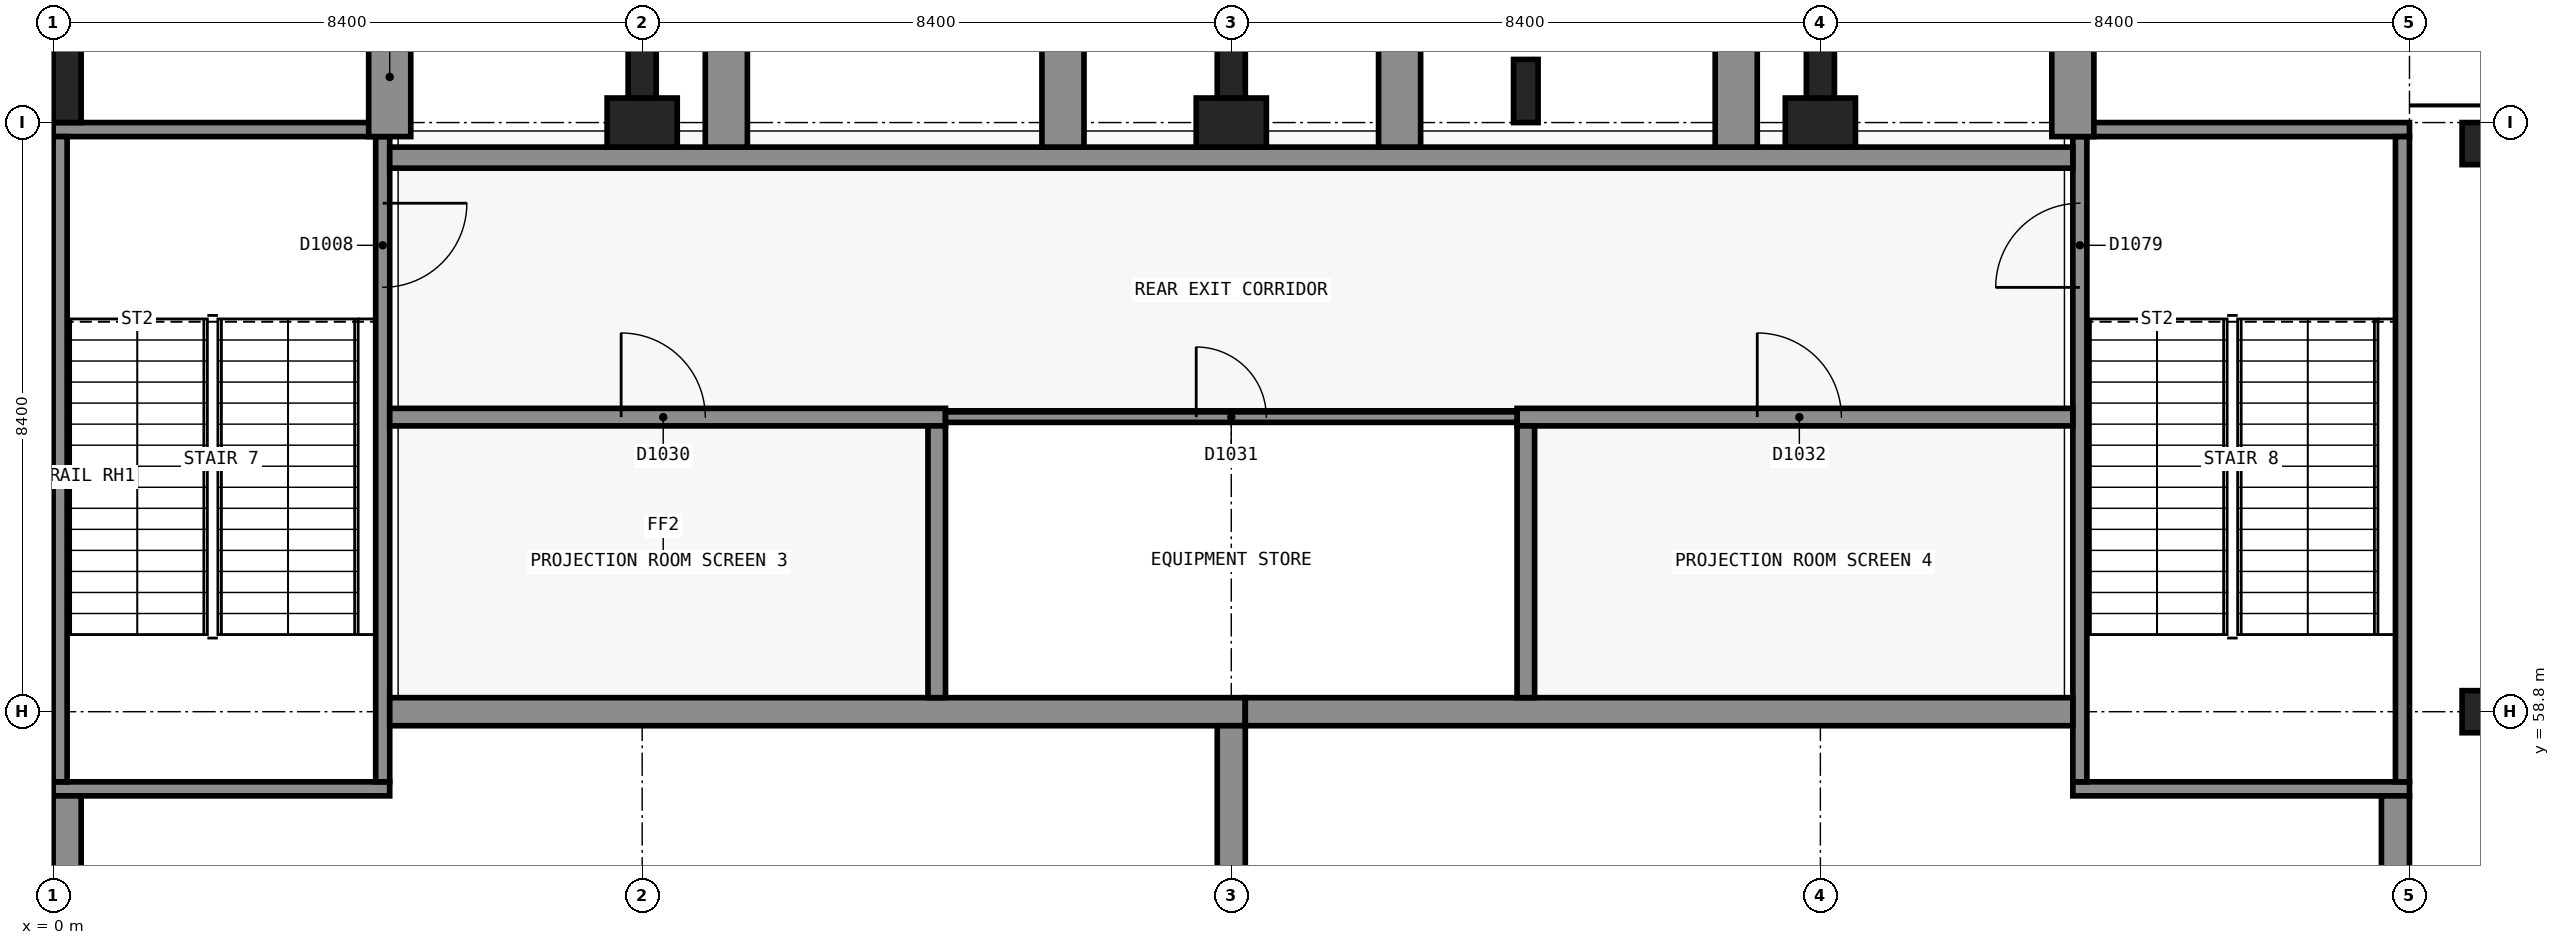
"""IFC4 building model, lengths in metres.
Left out: names, types, materials, properties, quantities, classifications, styles, units other than length and angle.
Written with IfcOpenShell. Run it as: python <this file> out.ifc"""

import sys

from ifc_helpers import new_model, si_unit, direction, frame, frame_2d, origin, origin_2d, place, context, subcontext, project, spatial, rectangle, extrude, element, fill, save


model = new_model("IFC4")
c1 = context("Model", 3, precision=1e-05, world=origin(), true_north=direction((0.0, 1.0)))
c2 = subcontext(c1, "Body", "Model", "MODEL_VIEW")
j1 = project(units=[si_unit("LENGTHUNIT", "METRE"), si_unit("PLANEANGLEUNIT", "RADIAN")], contexts=[c1])
p1 = place(None, origin())
s1 = spatial("IfcSite", under=j1, at=p1, CompositionType="ELEMENT")
p2 = place(p1, origin())
s2 = spatial("IfcBuilding", under=s1, at=p2, CompositionType="ELEMENT")
p3 = place(p2, frame((0.0, 0.0, 5.4)))
s3 = spatial("IfcBuildingStorey", under=s2, at=p3, CompositionType="ELEMENT", Elevation=5.4)
for number, where, z_axis, x_axis in (
    (1, (4.8, 57.7, 0.0), (0.0, 0.0, 1.0), (-1.0, 0.0, 0.0)),
    (2, (0.0, 67.1, 0.0), (0.0, 0.0, 1.0), (1.0, 0.0, 0.0)),
):
    element("IfcWall", number, at=place(p3, frame(where, z_axis=z_axis, x_axis=x_axis)), inside=s3, PredefinedType="SHEAR", context=c2, shape_type="SweptSolid", body=[
        extrude(rectangle(XDim=4.8, YDim=0.2, at=frame_2d((2.4, 0.0))), origin(), (0.0, 0.0, 1.0), 4.8),
    ])
p4 = place(p3, frame((0.1, 57.8, 0.0), z_axis=(0.0, 0.0, 1.0), x_axis=(0.0, 1.0, 0.0)))
e3 = element("IfcWall", 3, at=p4, inside=s3, PredefinedType="SHEAR", context=c2, shape_type="SweptSolid", body=[
    extrude(rectangle(XDim=9.2, YDim=0.2, at=frame_2d((4.6, 0.0))), origin(), (0.0, 0.0, 1.0), 4.8),
])
p5 = place(p3, frame((4.7, 67.0, 0.0), z_axis=(0.0, 0.0, 1.0), x_axis=(0.0, -1.0, 0.0)))
e4 = element("IfcWall", 4, at=p5, inside=s3, PredefinedType="SHEAR", context=c2, shape_type="SweptSolid", body=[
    extrude(rectangle(XDim=9.2, YDim=0.2, at=frame_2d((4.6, 0.0))), origin(), (0.0, 0.0, 1.0), 4.8),
])
p6 = place(p5, frame((0.95, 0.0, 0.0)))
e5 = element("IfcOpeningElement", 5, at=p6, cuts=e4, PredefinedType="OPENING", context=c2, shape_type="SweptSolid", body=[
    extrude(rectangle(XDim=1.2, YDim=2.1, at=frame_2d((0.6, 1.05))), frame((0.0, 0.11, 0.0), z_axis=(0.0, -1.0, 0.0), x_axis=(1.0, 0.0, 0.0)), (0.0, 0.0, 1.0), 0.22),
])
for number, where, z_axis, x_axis in (
    (6, (33.6, 57.7, 0.0), (0.0, 0.0, 1.0), (-1.0, 0.0, 0.0)),
    (7, (28.8, 67.1, 0.0), (0.0, 0.0, 1.0), (1.0, 0.0, 0.0)),
):
    element("IfcWall", number, at=place(p3, frame(where, z_axis=z_axis, x_axis=x_axis)), inside=s3, PredefinedType="SHEAR", context=c2, shape_type="SweptSolid", body=[
        extrude(rectangle(XDim=4.8, YDim=0.2, at=frame_2d((2.4, 0.0))), origin(), (0.0, 0.0, 1.0), 4.8),
    ])
p7 = place(p3, frame((28.9, 57.8, 0.0), z_axis=(0.0, 0.0, 1.0), x_axis=(0.0, 1.0, 0.0)))
e8 = element("IfcWall", 8, at=p7, inside=s3, PredefinedType="SHEAR", context=c2, shape_type="SweptSolid", body=[
    extrude(rectangle(XDim=9.2, YDim=0.2, at=frame_2d((4.6, 0.0))), origin(), (0.0, 0.0, 1.0), 4.8),
])
p8 = place(p7, frame((7.05, 0.0, 0.0)))
e9 = element("IfcOpeningElement", 9, at=p8, cuts=e8, PredefinedType="OPENING", context=c2, shape_type="SweptSolid", body=[
    extrude(rectangle(XDim=1.2, YDim=2.1, at=frame_2d((0.6, 1.05))), frame((0.0, 0.11, 0.0), z_axis=(0.0, -1.0, 0.0), x_axis=(1.0, 0.0, 0.0)), (0.0, 0.0, 1.0), 0.22),
])
p9 = place(p3, frame((33.5, 67.0, 0.0), z_axis=(0.0, 0.0, 1.0), x_axis=(0.0, -1.0, 0.0)))
e10 = element("IfcWall", 10, at=p9, inside=s3, PredefinedType="SHEAR", context=c2, shape_type="SweptSolid", body=[
    extrude(rectangle(XDim=9.2, YDim=0.2, at=frame_2d((4.6, 0.0))), origin(), (0.0, 0.0, 1.0), 4.8),
])
p10 = place(p3, frame((4.8, 58.8, 0.0), z_axis=(0.0, 0.0, 1.0), x_axis=(1.0, 0.0, 0.0)))
e11 = element("IfcWall", 11, at=p10, inside=s3, PredefinedType="SHEAR", context=c2, shape_type="SweptSolid", body=[
    extrude(rectangle(XDim=12.2, YDim=0.4, at=frame_2d((6.1, 0.0))), origin(), (0.0, 0.0, 1.0), 4.8),
])
p11 = place(p3, frame((0.2, 43.2, 0.0), z_axis=(0.0, 0.0, 1.0), x_axis=(0.0, 1.0, 0.0)))
e12 = element("IfcWall", 12, at=p11, inside=s3, PredefinedType="SHEAR", context=c2, shape_type="SweptSolid", body=[
    extrude(rectangle(XDim=14.4, YDim=0.4, at=frame_2d((7.2, 0.0))), origin(), (0.0, 0.0, 1.0), 4.8),
])
p12 = place(p3, frame((16.8, 58.6, 0.0), z_axis=(0.0, 0.0, 1.0), x_axis=(0.0, -1.0, 0.0)))
e13 = element("IfcWall", 13, at=p12, inside=s3, PredefinedType="SHEAR", context=c2, shape_type="SweptSolid", body=[
    extrude(rectangle(XDim=16.4, YDim=0.4, at=frame_2d((8.2, 0.0))), origin(), (0.0, 0.0, 1.0), 4.8),
])
p13 = place(p3, frame((17.0, 58.8, 0.0), z_axis=(0.0, 0.0, 1.0), x_axis=(1.0, 0.0, 0.0)))
e14 = element("IfcWall", 14, at=p13, inside=s3, PredefinedType="SHEAR", context=c2, shape_type="SweptSolid", body=[
    extrude(rectangle(XDim=11.8, YDim=0.4, at=frame_2d((5.9, 0.0))), origin(), (0.0, 0.0, 1.0), 4.8),
])
p14 = place(p3, frame((33.4, 57.6, 0.0), z_axis=(0.0, 0.0, 1.0), x_axis=(0.0, -1.0, 0.0)))
e15 = element("IfcWall", 15, at=p14, inside=s3, PredefinedType="SHEAR", context=c2, shape_type="SweptSolid", body=[
    extrude(rectangle(XDim=15.4, YDim=0.4, at=frame_2d((7.7, 0.0))), origin(), (0.0, 0.0, 1.0), 4.8),
])
for number, where, z_axis, x_axis in (
    (16, (8.4, 67.2, 0.0), (0.0, 0.0, 1.0), (1.0, 0.0, 0.0)),
    (17, (16.8, 67.2, 0.0), (0.0, 0.0, 1.0), (1.0, 0.0, 0.0)),
    (18, (25.2, 67.2, 0.0), (0.0, 0.0, 1.0), (1.0, 0.0, 0.0)),
):
    element("IfcColumn", number, at=place(p3, frame(where, z_axis=z_axis, x_axis=x_axis)), inside=s3, PredefinedType="COLUMN", context=c2, shape_type="SweptSolid", body=[
        extrude(rectangle(XDim=1.0, YDim=0.7, at=origin_2d()), origin(), (0.0, 0.0, 1.0), 4.8),
    ])
for number, where, z_axis, x_axis in (
    (19, (34.65, 58.8, 0.0), (0.0, 0.0, 1.0), (1.0, 0.0, 0.0)),
    (20, (34.65, 66.9, 0.0), (0.0, 0.0, 1.0), (1.0, 0.0, 0.0)),
):
    element("IfcColumn", number, at=place(p3, frame(where, z_axis=z_axis, x_axis=x_axis)), inside=s3, PredefinedType="COLUMN", context=c2, shape_type="SweptSolid", body=[
        extrude(rectangle(XDim=0.6, YDim=0.6, at=origin_2d()), origin(), (0.0, 0.0, 1.0), 4.8),
    ])
p15 = place(p3, frame((4.8, 66.7, 0.0), z_axis=(0.0, 0.0, 1.0), x_axis=(1.0, 0.0, 0.0)))
e21 = element("IfcWall", 21, at=p15, inside=s3, PredefinedType="SOLIDWALL", context=c2, shape_type="SweptSolid", body=[
    extrude(rectangle(XDim=24.0, YDim=0.3, at=frame_2d((12.0, 0.0))), origin(), (0.0, 0.0, 1.0), 4.5),
])
for number, where, z_axis, x_axis in (
    (22, (0.2, 67.8, 0.0), (0.0, 0.0, 1.0), (1.0, 0.0, 0.0)),
    (23, (8.4, 68.15, 0.0), (0.0, 0.0, 1.0), (1.0, 0.0, 0.0)),
    (24, (16.8, 68.15, 0.0), (0.0, 0.0, 1.0), (1.0, 0.0, 0.0)),
):
    element("IfcColumn", number, at=place(p3, frame(where, z_axis=z_axis, x_axis=x_axis)), inside=s3, PredefinedType="PILASTER", context=c2, shape_type="SweptSolid", body=[
        extrude(rectangle(XDim=0.4, YDim=1.2, at=origin_2d()), origin(), (0.0, 0.0, 1.0), 4.8),
    ])
p16 = place(p3, frame((21.0, 67.65, 0.0), z_axis=(0.0, 0.0, 1.0), x_axis=(1.0, 0.0, 0.0)))
e25 = element("IfcColumn", 25, at=p16, inside=s3, PredefinedType="PILASTER", context=c2, shape_type="SweptSolid", body=[
    extrude(rectangle(XDim=0.35, YDim=0.9, at=origin_2d()), origin(), (0.0, 0.0, 1.0), 4.8),
])
p17 = place(p3, frame((25.2, 68.15, 0.0), z_axis=(0.0, 0.0, 1.0), x_axis=(1.0, 0.0, 0.0)))
e26 = element("IfcColumn", 26, at=p17, inside=s3, PredefinedType="PILASTER", context=c2, shape_type="SweptSolid", body=[
    extrude(rectangle(XDim=0.4, YDim=1.2, at=origin_2d()), origin(), (0.0, 0.0, 1.0), 4.8),
])
p18 = place(p3, frame((4.8, 67.0, 0.0), z_axis=(0.0, 0.0, 1.0), x_axis=(0.0, 1.0, 0.0)))
e27 = element("IfcWall", 27, at=p18, inside=s3, PredefinedType="SOLIDWALL", context=c2, shape_type="SweptSolid", body=[
    extrude(rectangle(XDim=1.7, YDim=0.6, at=frame_2d((0.85, 0.0))), origin(), (0.0, 0.0, 1.0), 4.8),
])
for number, where, z_axis, x_axis in (
    (28, (9.6, 66.85, 0.0), (0.0, 0.0, 1.0), (0.0, 1.0, 0.0)),
    (29, (14.4, 66.85, 0.0), (0.0, 0.0, 1.0), (0.0, 1.0, 0.0)),
    (30, (19.2, 66.85, 0.0), (0.0, 0.0, 1.0), (0.0, 1.0, 0.0)),
    (31, (24.0, 66.85, 0.0), (0.0, 0.0, 1.0), (0.0, 1.0, 0.0)),
):
    element("IfcWall", number, at=place(p3, frame(where, z_axis=z_axis, x_axis=x_axis)), inside=s3, PredefinedType="SOLIDWALL", context=c2, shape_type="SweptSolid", body=[
        extrude(rectangle(XDim=1.85, YDim=0.6, at=frame_2d((0.925, 0.0))), origin(), (0.0, 0.0, 1.0), 4.8),
    ])
p19 = place(p3, frame((28.8, 67.0, 0.0), z_axis=(0.0, 0.0, 1.0), x_axis=(0.0, 1.0, 0.0)))
e32 = element("IfcWall", 32, at=p19, inside=s3, PredefinedType="SOLIDWALL", context=c2, shape_type="SweptSolid", body=[
    extrude(rectangle(XDim=1.7, YDim=0.6, at=frame_2d((0.85, 0.0))), origin(), (0.0, 0.0, 1.0), 4.8),
])
p20 = place(p3, frame((4.8, 63.0, 0.0), z_axis=(0.0, 0.0, 1.0), x_axis=(1.0, 0.0, 0.0)))
e33 = element("IfcWall", 33, at=p20, inside=s3, PredefinedType="PARTITIONING", context=c2, shape_type="SweptSolid", body=[
    extrude(rectangle(XDim=7.925, YDim=0.25, at=frame_2d((3.962, 0.0))), origin(), (0.0, 0.0, 1.0), 3.8),
])
p21 = place(p20, frame((3.3, 0.0, 0.0)))
e34 = element("IfcOpeningElement", 34, at=p21, cuts=e33, PredefinedType="OPENING", context=c2, shape_type="SweptSolid", body=[
    extrude(rectangle(XDim=1.2, YDim=2.1, at=frame_2d((0.6, 1.05))), frame((0.0, 0.135, 0.0), z_axis=(0.0, -1.0, 0.0), x_axis=(1.0, 0.0, 0.0)), (0.0, 0.0, 1.0), 0.27),
])
p22 = place(p3, frame((20.875, 63.0, 0.0), z_axis=(0.0, 0.0, 1.0), x_axis=(1.0, 0.0, 0.0)))
e35 = element("IfcWall", 35, at=p22, inside=s3, PredefinedType="PARTITIONING", context=c2, shape_type="SweptSolid", body=[
    extrude(rectangle(XDim=7.925, YDim=0.25, at=frame_2d((3.962, 0.0))), origin(), (0.0, 0.0, 1.0), 3.8),
])
p23 = place(p22, frame((3.425, 0.0, 0.0)))
e36 = element("IfcOpeningElement", 36, at=p23, cuts=e35, PredefinedType="OPENING", context=c2, shape_type="SweptSolid", body=[
    extrude(rectangle(XDim=1.2, YDim=2.1, at=frame_2d((0.6, 1.05))), frame((0.0, 0.135, 0.0), z_axis=(0.0, -1.0, 0.0), x_axis=(1.0, 0.0, 0.0)), (0.0, 0.0, 1.0), 0.27),
])
for number, where, z_axis, x_axis in (
    (37, (12.6, 59.0, 0.0), (0.0, 0.0, 1.0), (0.0, 1.0, 0.0)),
    (38, (21.0, 59.0, 0.0), (0.0, 0.0, 1.0), (0.0, 1.0, 0.0)),
):
    element("IfcWall", number, at=place(p3, frame(where, z_axis=z_axis, x_axis=x_axis)), inside=s3, PredefinedType="PARTITIONING", context=c2, shape_type="SweptSolid", body=[
        extrude(rectangle(XDim=3.875, YDim=0.25, at=frame_2d((1.938, 0.0))), origin(), (0.0, 0.0, 1.0), 4.5),
    ])
p24 = place(p3, frame((12.725, 63.0, 0.0), z_axis=(0.0, 0.0, 1.0), x_axis=(1.0, 0.0, 0.0)))
e39 = element("IfcWall", 39, at=p24, inside=s3, PredefinedType="PARTITIONING", context=c2, shape_type="SweptSolid", body=[
    extrude(rectangle(XDim=8.15, YDim=0.15, at=frame_2d((4.075, 0.0))), origin(), (0.0, 0.0, 1.0), 3.8),
])
p25 = place(p24, frame((3.575, 0.0, 0.0)))
e40 = element("IfcOpeningElement", 40, at=p25, cuts=e39, PredefinedType="OPENING", context=c2, shape_type="SweptSolid", body=[
    extrude(rectangle(XDim=1.0, YDim=2.1, at=frame_2d((0.5, 1.05))), frame((0.0, 0.085, 0.0), z_axis=(0.0, -1.0, 0.0), x_axis=(1.0, 0.0, 0.0)), (0.0, 0.0, 1.0), 0.17),
])
p26 = place(p6, origin())
e41 = element("IfcDoor", 41, at=p26, inside=s3, OperationType="SINGLE_SWING_RIGHT", PredefinedType="DOOR", context=c2, shape_type="SweptSolid", body=[
    extrude(rectangle(XDim=1.2, YDim=2.1, at=frame_2d((0.6, 1.05))), frame((0.0, 0.025, 0.0), z_axis=(0.0, -1.0, 0.0), x_axis=(1.0, 0.0, 0.0)), (0.0, 0.0, 1.0), 0.05),
])
fill(e5, e41)
p27 = place(p21, origin())
e42 = element("IfcDoor", 42, at=p27, inside=s3, OperationType="SINGLE_SWING_LEFT", PredefinedType="DOOR", context=c2, shape_type="SweptSolid", body=[
    extrude(rectangle(XDim=1.2, YDim=2.1, at=frame_2d((0.6, 1.05))), frame((0.0, 0.025, 0.0), z_axis=(0.0, -1.0, 0.0), x_axis=(1.0, 0.0, 0.0)), (0.0, 0.0, 1.0), 0.05),
])
fill(e34, e42)
p28 = place(p25, origin())
e43 = element("IfcDoor", 43, at=p28, inside=s3, OperationType="SINGLE_SWING_RIGHT", PredefinedType="DOOR", context=c2, shape_type="SweptSolid", body=[
    extrude(rectangle(XDim=1.0, YDim=2.1, at=frame_2d((0.5, 1.05))), frame((0.0, 0.025, 0.0), z_axis=(0.0, -1.0, 0.0), x_axis=(1.0, 0.0, 0.0)), (0.0, 0.0, 1.0), 0.05),
])
fill(e40, e43)
p29 = place(p23, origin())
e44 = element("IfcDoor", 44, at=p29, inside=s3, OperationType="SINGLE_SWING_LEFT", PredefinedType="DOOR", context=c2, shape_type="SweptSolid", body=[
    extrude(rectangle(XDim=1.2, YDim=2.1, at=frame_2d((0.6, 1.05))), frame((0.0, 0.025, 0.0), z_axis=(0.0, -1.0, 0.0), x_axis=(1.0, 0.0, 0.0)), (0.0, 0.0, 1.0), 0.05),
])
fill(e36, e44)
p30 = place(p8, origin())
e45 = element("IfcDoor", 45, at=p30, inside=s3, OperationType="SINGLE_SWING_RIGHT", PredefinedType="DOOR", context=c2, shape_type="SweptSolid", body=[
    extrude(rectangle(XDim=1.2, YDim=2.1, at=frame_2d((0.6, 1.05))), frame((0.0, 0.025, 0.0), z_axis=(0.0, -1.0, 0.0), x_axis=(1.0, 0.0, 0.0)), (0.0, 0.0, 1.0), 0.05),
])
fill(e9, e45)
save(model, sys.argv[1])
